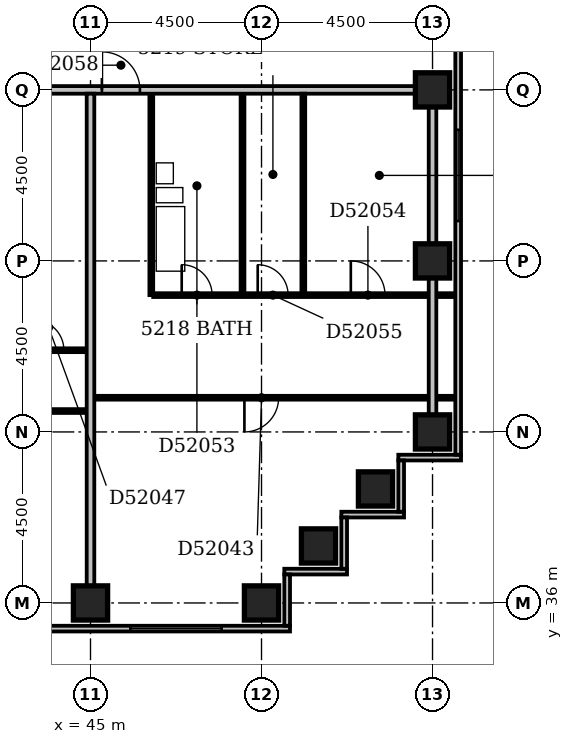
"""IFC4 building model, lengths in metres.
Left out: names, types, materials, properties, quantities, classifications, styles, units other than length and angle.
Written with IfcOpenShell. Run it as: python <this file> out.ifc"""

import sys

from ifc_helpers import new_model, si_unit, direction, frame, frame_2d, origin, origin_2d, place, context, subcontext, project, spatial, rectangle, extrude, element, fill, save


model = new_model("IFC4")
c1 = context("Model", 3, precision=1e-05, world=origin(), true_north=direction((0.0, 1.0)))
c2 = subcontext(c1, "Body", "Model", "MODEL_VIEW")
j1 = project(units=[si_unit("LENGTHUNIT", "METRE"), si_unit("PLANEANGLEUNIT", "RADIAN")], contexts=[c1])
p1 = place(None, origin())
s1 = spatial("IfcSite", under=j1, at=p1, CompositionType="ELEMENT")
p2 = place(p1, origin())
s2 = spatial("IfcBuilding", under=s1, at=p2, CompositionType="ELEMENT")
p3 = place(p2, frame((0.0, 0.0, 204.2)))
s3 = spatial("IfcBuildingStorey", under=s2, at=p3, CompositionType="ELEMENT", Elevation=204.2)
for number, where, z_axis, x_axis in (
    (1, (45.0, 36.0, -0.3), (0.0, 0.0, 1.0), (1.0, 0.0, 0.0)),
    (2, (49.5, 36.0, -0.3), (0.0, 0.0, 1.0), (1.0, 0.0, 0.0)),
    (3, (51.0, 37.5, -0.3), (0.0, 0.0, 1.0), (1.0, 0.0, 0.0)),
    (4, (52.5, 39.0, -0.3), (0.0, 0.0, 1.0), (1.0, 0.0, 0.0)),
    (5, (54.0, 40.5, -0.3), (0.0, 0.0, 1.0), (1.0, 0.0, 0.0)),
    (6, (54.0, 45.0, -0.3), (0.0, 0.0, 1.0), (1.0, 0.0, 0.0)),
    (7, (54.0, 49.5, -0.3), (0.0, 0.0, 1.0), (1.0, 0.0, 0.0)),
):
    element("IfcColumn", number, at=place(p3, frame(where, z_axis=z_axis, x_axis=x_axis)), inside=s3, PredefinedType="COLUMN", context=c2, shape_type="SweptSolid", body=[
        extrude(rectangle(XDim=0.9, YDim=0.9, at=origin_2d()), origin(), (0.0, 0.0, 1.0), 3.6),
    ])
p4 = place(p3, frame((23.1, 35.325, 0.0), z_axis=(0.0, 0.0, 1.0), x_axis=(1.0, 0.0, 0.0)))
e8 = element("IfcWall", 8, at=p4, inside=s3, PredefinedType="STANDARD", context=c2, shape_type="SweptSolid", body=[
    extrude(rectangle(XDim=27.15, YDim=0.15, at=frame_2d((13.575, 0.0))), origin(), (0.0, 0.0, 1.0), 2.7),
])
p5 = place(p4, frame((0.45, 0.0, 0.6)))
e9 = element("IfcOpeningElement", 9, at=p5, cuts=e8, PredefinedType="OPENING", context=c2, shape_type="SweptSolid", body=[
    extrude(rectangle(XDim=2.4, YDim=1.8, at=frame_2d((1.2, 0.9))), frame((0.0, 0.087, 0.0), z_axis=(0.0, -1.0, 0.0), x_axis=(1.0, 0.0, 0.0)), (0.0, 0.0, 1.0), 0.174),
])
p6 = place(p4, frame((4.95, 0.0, 0.6)))
e10 = element("IfcOpeningElement", 10, at=p6, cuts=e8, PredefinedType="OPENING", context=c2, shape_type="SweptSolid", body=[
    extrude(rectangle(XDim=2.4, YDim=1.8, at=frame_2d((1.2, 0.9))), frame((0.0, 0.087, 0.0), z_axis=(0.0, -1.0, 0.0), x_axis=(1.0, 0.0, 0.0)), (0.0, 0.0, 1.0), 0.174),
])
p7 = place(p4, frame((9.118, 0.0, 0.6)))
e11 = element("IfcOpeningElement", 11, at=p7, cuts=e8, PredefinedType="OPENING", context=c2, shape_type="SweptSolid", body=[
    extrude(rectangle(XDim=0.45, YDim=1.8, at=frame_2d((0.225, 0.9))), frame((0.0, 0.087, 0.0), z_axis=(0.0, -1.0, 0.0), x_axis=(1.0, 0.0, 0.0)), (0.0, 0.0, 1.0), 0.174),
])
p8 = place(p4, frame((11.218, 0.0, 0.6)))
e12 = element("IfcOpeningElement", 12, at=p8, cuts=e8, PredefinedType="OPENING", context=c2, shape_type="SweptSolid", body=[
    extrude(rectangle(XDim=0.9, YDim=1.8, at=frame_2d((0.45, 0.9))), frame((0.0, 0.087, 0.0), z_axis=(0.0, -1.0, 0.0), x_axis=(1.0, 0.0, 0.0)), (0.0, 0.0, 1.0), 0.174),
])
p9 = place(p4, frame((13.61, 0.0, 0.6)))
e13 = element("IfcOpeningElement", 13, at=p9, cuts=e8, PredefinedType="OPENING", context=c2, shape_type="SweptSolid", body=[
    extrude(rectangle(XDim=1.2, YDim=1.8, at=frame_2d((0.6, 0.9))), frame((0.0, 0.087, 0.0), z_axis=(0.0, -1.0, 0.0), x_axis=(1.0, 0.0, 0.0)), (0.0, 0.0, 1.0), 0.174),
])
p10 = place(p4, frame((18.45, 0.0, 0.6)))
e14 = element("IfcOpeningElement", 14, at=p10, cuts=e8, PredefinedType="OPENING", context=c2, shape_type="SweptSolid", body=[
    extrude(rectangle(XDim=2.4, YDim=1.8, at=frame_2d((1.2, 0.9))), frame((0.0, 0.087, 0.0), z_axis=(0.0, -1.0, 0.0), x_axis=(1.0, 0.0, 0.0)), (0.0, 0.0, 1.0), 0.174),
])
p11 = place(p4, frame((22.95, 0.0, 0.6)))
e15 = element("IfcOpeningElement", 15, at=p11, cuts=e8, PredefinedType="OPENING", context=c2, shape_type="SweptSolid", body=[
    extrude(rectangle(XDim=2.4, YDim=1.8, at=frame_2d((1.2, 0.9))), frame((0.0, 0.087, 0.0), z_axis=(0.0, -1.0, 0.0), x_axis=(1.0, 0.0, 0.0)), (0.0, 0.0, 1.0), 0.174),
])
p12 = place(p3, frame((50.175, 35.4, 0.0), z_axis=(0.0, 0.0, 1.0), x_axis=(0.0, 1.0, 0.0)))
e16 = element("IfcWall", 16, at=p12, inside=s3, PredefinedType="STANDARD", context=c2, shape_type="SweptSolid", body=[
    extrude(rectangle(XDim=1.35, YDim=0.15, at=frame_2d((0.675, 0.0))), origin(), (0.0, 0.0, 1.0), 2.7),
])
p13 = place(p3, frame((50.1, 36.825, 0.0), z_axis=(0.0, 0.0, 1.0), x_axis=(1.0, 0.0, 0.0)))
e17 = element("IfcWall", 17, at=p13, inside=s3, PredefinedType="STANDARD", context=c2, shape_type="SweptSolid", body=[
    extrude(rectangle(XDim=1.65, YDim=0.15, at=frame_2d((0.825, 0.0))), origin(), (0.0, 0.0, 1.0), 2.7),
])
p14 = place(p3, frame((51.675, 36.9, 0.0), z_axis=(0.0, 0.0, 1.0), x_axis=(0.0, 1.0, 0.0)))
e18 = element("IfcWall", 18, at=p14, inside=s3, PredefinedType="STANDARD", context=c2, shape_type="SweptSolid", body=[
    extrude(rectangle(XDim=1.35, YDim=0.15, at=frame_2d((0.675, 0.0))), origin(), (0.0, 0.0, 1.0), 2.7),
])
p15 = place(p3, frame((51.6, 38.325, 0.0), z_axis=(0.0, 0.0, 1.0), x_axis=(1.0, 0.0, 0.0)))
e19 = element("IfcWall", 19, at=p15, inside=s3, PredefinedType="STANDARD", context=c2, shape_type="SweptSolid", body=[
    extrude(rectangle(XDim=1.65, YDim=0.15, at=frame_2d((0.825, 0.0))), origin(), (0.0, 0.0, 1.0), 2.7),
])
p16 = place(p3, frame((53.175, 38.4, 0.0), z_axis=(0.0, 0.0, 1.0), x_axis=(0.0, 1.0, 0.0)))
e20 = element("IfcWall", 20, at=p16, inside=s3, PredefinedType="STANDARD", context=c2, shape_type="SweptSolid", body=[
    extrude(rectangle(XDim=1.35, YDim=0.15, at=frame_2d((0.675, 0.0))), origin(), (0.0, 0.0, 1.0), 2.7),
])
p17 = place(p3, frame((53.1, 39.825, 0.0), z_axis=(0.0, 0.0, 1.0), x_axis=(1.0, 0.0, 0.0)))
e21 = element("IfcWall", 21, at=p17, inside=s3, PredefinedType="STANDARD", context=c2, shape_type="SweptSolid", body=[
    extrude(rectangle(XDim=1.65, YDim=0.15, at=frame_2d((0.825, 0.0))), origin(), (0.0, 0.0, 1.0), 2.7),
])
p18 = place(p3, frame((54.675, 39.9, 0.0), z_axis=(0.0, 0.0, 1.0), x_axis=(0.0, 1.0, 0.0)))
e22 = element("IfcWall", 22, at=p18, inside=s3, PredefinedType="STANDARD", context=c2, shape_type="SweptSolid", body=[
    extrude(rectangle(XDim=14.85, YDim=0.15, at=frame_2d((7.425, 0.0))), origin(), (0.0, 0.0, 1.0), 2.7),
])
p19 = place(p18, frame((6.15, 0.0, 0.6)))
e23 = element("IfcOpeningElement", 23, at=p19, cuts=e22, PredefinedType="OPENING", context=c2, shape_type="SweptSolid", body=[
    extrude(rectangle(XDim=2.4, YDim=1.8, at=frame_2d((1.2, 0.9))), frame((0.0, 0.087, 0.0), z_axis=(0.0, -1.0, 0.0), x_axis=(1.0, 0.0, 0.0)), (0.0, 0.0, 1.0), 0.174),
])
p20 = place(p3, frame((45.0, 36.45, 0.0), z_axis=(0.0, 0.0, 1.0), x_axis=(0.0, 1.0, 0.0)))
e24 = element("IfcWall", 24, at=p20, inside=s3, PredefinedType="PARTITIONING", context=c2, shape_type="SweptSolid", body=[
    extrude(rectangle(XDim=12.95, YDim=0.2, at=frame_2d((6.475, 0.0))), origin(), (0.0, 0.0, 1.0), 2.6),
])
p21 = place(p3, frame((54.0, 40.95, 0.0), z_axis=(0.0, 0.0, 1.0), x_axis=(0.0, 1.0, 0.0)))
e25 = element("IfcWall", 25, at=p21, inside=s3, PredefinedType="PARTITIONING", context=c2, shape_type="SweptSolid", body=[
    extrude(rectangle(XDim=8.1, YDim=0.2, at=frame_2d((4.05, 0.0))), origin(), (0.0, 0.0, 1.0), 2.7),
])
p22 = place(p3, frame((22.6, 41.05, 0.0), z_axis=(0.0, 0.0, 1.0), x_axis=(1.0, 0.0, 0.0)))
e26 = element("IfcWall", 26, at=p22, inside=s3, PredefinedType="PARTITIONING", context=c2, shape_type="SweptSolid", body=[
    extrude(rectangle(XDim=22.3, YDim=0.1, at=frame_2d((11.15, 0.0))), origin(), (0.0, 0.0, 1.0), 3.3),
])
p23 = place(p22, frame((3.9, 0.0, 0.0)))
e27 = element("IfcOpeningElement", 27, at=p23, cuts=e26, PredefinedType="OPENING", context=c2, shape_type="SweptSolid", body=[
    extrude(rectangle(XDim=0.9, YDim=2.1, at=frame_2d((0.45, 1.05))), frame((0.0, 0.062, 0.0), z_axis=(0.0, -1.0, 0.0), x_axis=(1.0, 0.0, 0.0)), (0.0, 0.0, 1.0), 0.124),
])
p24 = place(p22, frame((9.55, 0.0, 0.0)))
e28 = element("IfcOpeningElement", 28, at=p24, cuts=e26, PredefinedType="OPENING", context=c2, shape_type="SweptSolid", body=[
    extrude(rectangle(XDim=0.9, YDim=2.1, at=frame_2d((0.45, 1.05))), frame((0.0, 0.062, 0.0), z_axis=(0.0, -1.0, 0.0), x_axis=(1.0, 0.0, 0.0)), (0.0, 0.0, 1.0), 0.124),
])
p25 = place(p22, frame((16.35, 0.0, 0.0)))
e29 = element("IfcOpeningElement", 29, at=p25, cuts=e26, PredefinedType="OPENING", context=c2, shape_type="SweptSolid", body=[
    extrude(rectangle(XDim=0.9, YDim=2.1, at=frame_2d((0.45, 1.05))), frame((0.0, 0.062, 0.0), z_axis=(0.0, -1.0, 0.0), x_axis=(1.0, 0.0, 0.0)), (0.0, 0.0, 1.0), 0.124),
])
p26 = place(p22, frame((19.7, 0.0, 0.0)))
e30 = element("IfcOpeningElement", 30, at=p26, cuts=e26, PredefinedType="OPENING", context=c2, shape_type="SweptSolid", body=[
    extrude(rectangle(XDim=0.9, YDim=2.1, at=frame_2d((0.45, 1.05))), frame((0.0, 0.062, 0.0), z_axis=(0.0, -1.0, 0.0), x_axis=(1.0, 0.0, 0.0)), (0.0, 0.0, 1.0), 0.124),
])
p27 = place(p3, frame((45.1, 41.4, 0.0), z_axis=(0.0, 0.0, 1.0), x_axis=(1.0, 0.0, 0.0)))
e31 = element("IfcWall", 31, at=p27, inside=s3, PredefinedType="PARTITIONING", context=c2, shape_type="SweptSolid", body=[
    extrude(rectangle(XDim=9.5, YDim=0.1, at=frame_2d((4.75, 0.0))), origin(), (0.0, 0.0, 1.0), 3.3),
])
p28 = place(p27, frame((3.95, 0.0, 0.0)))
e32 = element("IfcOpeningElement", 32, at=p28, cuts=e31, PredefinedType="OPENING", context=c2, shape_type="SweptSolid", body=[
    extrude(rectangle(XDim=0.9, YDim=2.1, at=frame_2d((0.45, 1.05))), frame((0.0, 0.062, 0.0), z_axis=(0.0, -1.0, 0.0), x_axis=(1.0, 0.0, 0.0)), (0.0, 0.0, 1.0), 0.124),
])
p29 = place(p3, frame((24.15, 42.65, 0.0), z_axis=(0.0, 0.0, 1.0), x_axis=(1.0, 0.0, 0.0)))
e33 = element("IfcWall", 33, at=p29, inside=s3, PredefinedType="PARTITIONING", context=c2, shape_type="SweptSolid", body=[
    extrude(rectangle(XDim=20.75, YDim=0.1, at=frame_2d((10.375, 0.0))), origin(), (0.0, 0.0, 1.0), 3.3),
])
p30 = place(p29, frame((5.95, 0.0, 0.0)))
e34 = element("IfcOpeningElement", 34, at=p30, cuts=e33, PredefinedType="OPENING", context=c2, shape_type="SweptSolid", body=[
    extrude(rectangle(XDim=0.8, YDim=2.1, at=frame_2d((0.4, 1.05))), frame((0.0, 0.062, 0.0), z_axis=(0.0, -1.0, 0.0), x_axis=(1.0, 0.0, 0.0)), (0.0, 0.0, 1.0), 0.124),
])
p31 = place(p29, frame((11.35, 0.0, 0.0)))
e35 = element("IfcOpeningElement", 35, at=p31, cuts=e33, PredefinedType="OPENING", context=c2, shape_type="SweptSolid", body=[
    extrude(rectangle(XDim=0.8, YDim=2.1, at=frame_2d((0.4, 1.05))), frame((0.0, 0.062, 0.0), z_axis=(0.0, -1.0, 0.0), x_axis=(1.0, 0.0, 0.0)), (0.0, 0.0, 1.0), 0.124),
])
p32 = place(p29, frame((2.1, 0.0, 0.0)))
e36 = element("IfcOpeningElement", 36, at=p32, cuts=e33, PredefinedType="OPENING", context=c2, shape_type="SweptSolid", body=[
    extrude(rectangle(XDim=0.9, YDim=2.1, at=frame_2d((0.45, 1.05))), frame((0.0, 0.062, 0.0), z_axis=(0.0, -1.0, 0.0), x_axis=(1.0, 0.0, 0.0)), (0.0, 0.0, 1.0), 0.124),
])
p33 = place(p29, frame((19.35, 0.0, 0.0)))
e37 = element("IfcOpeningElement", 37, at=p33, cuts=e33, PredefinedType="OPENING", context=c2, shape_type="SweptSolid", body=[
    extrude(rectangle(XDim=0.8, YDim=2.1, at=frame_2d((0.4, 1.05))), frame((0.0, 0.062, 0.0), z_axis=(0.0, -1.0, 0.0), x_axis=(1.0, 0.0, 0.0)), (0.0, 0.0, 1.0), 0.124),
])
p34 = place(p29, frame((15.45, 0.0, 0.0)))
e38 = element("IfcOpeningElement", 38, at=p34, cuts=e33, PredefinedType="OPENING", context=c2, shape_type="SweptSolid", body=[
    extrude(rectangle(XDim=0.8, YDim=2.1, at=frame_2d((0.4, 1.05))), frame((0.0, 0.062, 0.0), z_axis=(0.0, -1.0, 0.0), x_axis=(1.0, 0.0, 0.0)), (0.0, 0.0, 1.0), 0.124),
])
p35 = place(p29, frame((9.45, 0.0, 0.0)))
e39 = element("IfcOpeningElement", 39, at=p35, cuts=e33, PredefinedType="OPENING", context=c2, shape_type="SweptSolid", body=[
    extrude(rectangle(XDim=0.8, YDim=2.1, at=frame_2d((0.4, 1.05))), frame((0.0, 0.062, 0.0), z_axis=(0.0, -1.0, 0.0), x_axis=(1.0, 0.0, 0.0)), (0.0, 0.0, 1.0), 0.124),
])
p36 = place(p29, frame((13.45, 0.0, 0.0)))
e40 = element("IfcOpeningElement", 40, at=p36, cuts=e33, PredefinedType="OPENING", context=c2, shape_type="SweptSolid", body=[
    extrude(rectangle(XDim=0.8, YDim=2.1, at=frame_2d((0.4, 1.05))), frame((0.0, 0.062, 0.0), z_axis=(0.0, -1.0, 0.0), x_axis=(1.0, 0.0, 0.0)), (0.0, 0.0, 1.0), 0.124),
])
p37 = place(p29, frame((17.35, 0.0, 0.0)))
e41 = element("IfcOpeningElement", 41, at=p37, cuts=e33, PredefinedType="OPENING", context=c2, shape_type="SweptSolid", body=[
    extrude(rectangle(XDim=0.8, YDim=2.1, at=frame_2d((0.4, 1.05))), frame((0.0, 0.062, 0.0), z_axis=(0.0, -1.0, 0.0), x_axis=(1.0, 0.0, 0.0)), (0.0, 0.0, 1.0), 0.124),
])
p38 = place(p29, frame((7.9, 0.0, 0.0)))
e42 = element("IfcOpeningElement", 42, at=p38, cuts=e33, PredefinedType="OPENING", context=c2, shape_type="SweptSolid", body=[
    extrude(rectangle(XDim=0.8, YDim=2.1, at=frame_2d((0.4, 1.05))), frame((0.0, 0.062, 0.0), z_axis=(0.0, -1.0, 0.0), x_axis=(1.0, 0.0, 0.0)), (0.0, 0.0, 1.0), 0.124),
])
p39 = place(p3, frame((46.6, 44.1, 0.0), z_axis=(0.0, 0.0, 1.0), x_axis=(0.0, 1.0, 0.0)))
e43 = element("IfcWall", 43, at=p39, inside=s3, PredefinedType="PLUMBINGWALL", context=c2, shape_type="SweptSolid", body=[
    extrude(rectangle(XDim=5.3, YDim=0.1, at=frame_2d((2.65, 0.0))), origin(), (0.0, 0.0, 1.0), 3.3),
])
p40 = place(p3, frame((46.65, 44.1, 0.0), z_axis=(0.0, 0.0, 1.0), x_axis=(1.0, 0.0, 0.0)))
e44 = element("IfcWall", 44, at=p40, inside=s3, PredefinedType="PARTITIONING", context=c2, shape_type="SweptSolid", body=[
    extrude(rectangle(XDim=7.95, YDim=0.1, at=frame_2d((3.975, 0.0))), origin(), (0.0, 0.0, 1.0), 3.3),
])
p41 = place(p40, frame((0.75, 0.0, 0.0)))
e45 = element("IfcOpeningElement", 45, at=p41, cuts=e44, PredefinedType="OPENING", context=c2, shape_type="SweptSolid", body=[
    extrude(rectangle(XDim=0.8, YDim=2.1, at=frame_2d((0.4, 1.05))), frame((0.0, 0.062, 0.0), z_axis=(0.0, -1.0, 0.0), x_axis=(1.0, 0.0, 0.0)), (0.0, 0.0, 1.0), 0.124),
])
p42 = place(p40, frame((5.2, 0.0, 0.0)))
e46 = element("IfcOpeningElement", 46, at=p42, cuts=e44, PredefinedType="OPENING", context=c2, shape_type="SweptSolid", body=[
    extrude(rectangle(XDim=0.9, YDim=2.1, at=frame_2d((0.45, 1.05))), frame((0.0, 0.062, 0.0), z_axis=(0.0, -1.0, 0.0), x_axis=(1.0, 0.0, 0.0)), (0.0, 0.0, 1.0), 0.124),
])
p43 = place(p40, frame((2.75, 0.0, 0.0)))
e47 = element("IfcOpeningElement", 47, at=p43, cuts=e44, PredefinedType="OPENING", context=c2, shape_type="SweptSolid", body=[
    extrude(rectangle(XDim=0.8, YDim=2.1, at=frame_2d((0.4, 1.05))), frame((0.0, 0.062, 0.0), z_axis=(0.0, -1.0, 0.0), x_axis=(1.0, 0.0, 0.0)), (0.0, 0.0, 1.0), 0.124),
])
p44 = place(p3, frame((49.0, 44.15, 0.0), z_axis=(0.0, 0.0, 1.0), x_axis=(0.0, 1.0, 0.0)))
e48 = element("IfcWall", 48, at=p44, inside=s3, PredefinedType="PLUMBINGWALL", context=c2, shape_type="SweptSolid", body=[
    extrude(rectangle(XDim=5.25, YDim=0.1, at=frame_2d((2.625, 0.0))), origin(), (0.0, 0.0, 1.0), 3.3),
])
p45 = place(p3, frame((50.6, 44.15, 0.0), z_axis=(0.0, 0.0, 1.0), x_axis=(0.0, 1.0, 0.0)))
e49 = element("IfcWall", 49, at=p45, inside=s3, PredefinedType="PARTITIONING", context=c2, shape_type="SweptSolid", body=[
    extrude(rectangle(XDim=5.25, YDim=0.1, at=frame_2d((2.625, 0.0))), origin(), (0.0, 0.0, 1.0), 3.3),
])
p46 = place(p3, frame((22.6, 49.5, 0.0), z_axis=(0.0, 0.0, 1.0), x_axis=(1.0, 0.0, 0.0)))
e50 = element("IfcWall", 50, at=p46, inside=s3, PredefinedType="PARTITIONING", context=c2, shape_type="SweptSolid", body=[
    extrude(rectangle(XDim=30.95, YDim=0.2, at=frame_2d((15.475, 0.0))), origin(), (0.0, 0.0, 1.0), 3.3),
])
p47 = place(p46, frame((0.2, 0.0, 0.0)))
e51 = element("IfcOpeningElement", 51, at=p47, cuts=e50, PredefinedType="OPENING", context=c2, shape_type="SweptSolid", body=[
    extrude(rectangle(XDim=1.0, YDim=2.1, at=frame_2d((0.5, 1.05))), frame((0.0, 0.112, 0.0), z_axis=(0.0, -1.0, 0.0), x_axis=(1.0, 0.0, 0.0)), (0.0, 0.0, 1.0), 0.224),
])
p48 = place(p46, frame((22.7, 0.0, 0.0)))
e52 = element("IfcOpeningElement", 52, at=p48, cuts=e50, PredefinedType="OPENING", context=c2, shape_type="SweptSolid", body=[
    extrude(rectangle(XDim=1.0, YDim=2.1, at=frame_2d((0.5, 1.05))), frame((0.0, 0.112, 0.0), z_axis=(0.0, -1.0, 0.0), x_axis=(1.0, 0.0, 0.0)), (0.0, 0.0, 1.0), 0.224),
])
p49 = place(p11, origin())
e53 = element("IfcWindow", 53, at=p49, inside=s3, PartitioningType="SINGLE_PANEL", PredefinedType="WINDOW", context=c2, shape_type="SweptSolid", body=[
    extrude(rectangle(XDim=2.4, YDim=1.8, at=frame_2d((1.2, 0.9))), frame((0.0, 0.03, 0.0), z_axis=(0.0, -1.0, 0.0), x_axis=(1.0, 0.0, 0.0)), (0.0, 0.0, 1.0), 0.06),
])
fill(e15, e53)
p50 = place(p19, origin())
e54 = element("IfcWindow", 54, at=p50, inside=s3, PartitioningType="SINGLE_PANEL", PredefinedType="WINDOW", context=c2, shape_type="SweptSolid", body=[
    extrude(rectangle(XDim=2.4, YDim=1.8, at=frame_2d((1.2, 0.9))), frame((0.0, 0.03, 0.0), z_axis=(0.0, -1.0, 0.0), x_axis=(1.0, 0.0, 0.0)), (0.0, 0.0, 1.0), 0.06),
])
fill(e23, e54)
p51 = place(p28, frame((0.9, 0.0, 0.0), z_axis=(0.0, 0.0, 1.0), x_axis=(-1.0, 0.0, 0.0)))
e55 = element("IfcDoor", 55, at=p51, inside=s3, OperationType="SINGLE_SWING_RIGHT", PredefinedType="DOOR", context=c2, shape_type="SweptSolid", body=[
    extrude(rectangle(XDim=0.9, YDim=2.1, at=frame_2d((0.45, 1.05))), frame((0.0, 0.025, 0.0), z_axis=(0.0, -1.0, 0.0), x_axis=(1.0, 0.0, 0.0)), (0.0, 0.0, 1.0), 0.05),
])
fill(e32, e55)
p52 = place(p33, origin())
e56 = element("IfcDoor", 56, at=p52, inside=s3, OperationType="SINGLE_SWING_LEFT", PredefinedType="DOOR", context=c2, shape_type="SweptSolid", body=[
    extrude(rectangle(XDim=0.8, YDim=2.1, at=frame_2d((0.4, 1.05))), frame((0.0, 0.025, 0.0), z_axis=(0.0, -1.0, 0.0), x_axis=(1.0, 0.0, 0.0)), (0.0, 0.0, 1.0), 0.05),
])
fill(e37, e56)
p53 = place(p41, origin())
e57 = element("IfcDoor", 57, at=p53, inside=s3, OperationType="SINGLE_SWING_LEFT", PredefinedType="DOOR", context=c2, shape_type="SweptSolid", body=[
    extrude(rectangle(XDim=0.8, YDim=2.1, at=frame_2d((0.4, 1.05))), frame((0.0, 0.025, 0.0), z_axis=(0.0, -1.0, 0.0), x_axis=(1.0, 0.0, 0.0)), (0.0, 0.0, 1.0), 0.05),
])
fill(e45, e57)
p54 = place(p42, origin())
e58 = element("IfcDoor", 58, at=p54, inside=s3, OperationType="SINGLE_SWING_LEFT", PredefinedType="DOOR", context=c2, shape_type="SweptSolid", body=[
    extrude(rectangle(XDim=0.9, YDim=2.1, at=frame_2d((0.45, 1.05))), frame((0.0, 0.025, 0.0), z_axis=(0.0, -1.0, 0.0), x_axis=(1.0, 0.0, 0.0)), (0.0, 0.0, 1.0), 0.05),
])
fill(e46, e58)
p55 = place(p43, origin())
e59 = element("IfcDoor", 59, at=p55, inside=s3, OperationType="SINGLE_SWING_LEFT", PredefinedType="DOOR", context=c2, shape_type="SweptSolid", body=[
    extrude(rectangle(XDim=0.8, YDim=2.1, at=frame_2d((0.4, 1.05))), frame((0.0, 0.025, 0.0), z_axis=(0.0, -1.0, 0.0), x_axis=(1.0, 0.0, 0.0)), (0.0, 0.0, 1.0), 0.05),
])
fill(e47, e59)
p56 = place(p48, origin())
e60 = element("IfcDoor", 60, at=p56, inside=s3, OperationType="SINGLE_SWING_LEFT", PredefinedType="DOOR", context=c2, shape_type="SweptSolid", body=[
    extrude(rectangle(XDim=1.0, YDim=2.1, at=frame_2d((0.5, 1.05))), frame((0.0, 0.025, 0.0), z_axis=(0.0, -1.0, 0.0), x_axis=(1.0, 0.0, 0.0)), (0.0, 0.0, 1.0), 0.05),
])
fill(e52, e60)
save(model, sys.argv[1])
